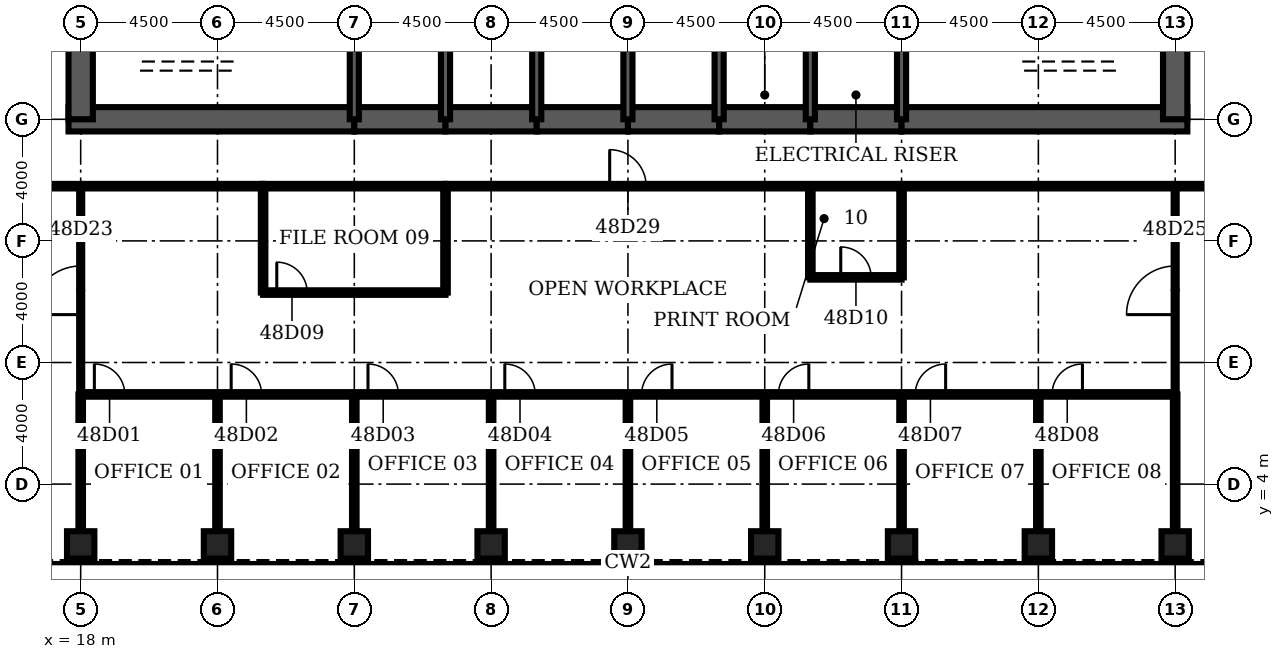
"""IFC4 building model, lengths in metres.
Left out: names, types, materials, properties, quantities, classifications, styles, units other than length and angle.
Written with IfcOpenShell. Run it as: python <this file> out.ifc"""

import sys

from ifc_helpers import new_model, si_unit, direction, frame, frame_2d, origin, origin_2d, place, context, subcontext, project, spatial, rectangle, hollow_rectangle, extrude, element, fill, save


model = new_model("IFC4")
c1 = context("Model", 3, precision=1e-05, world=origin(), true_north=direction((0.0, 1.0)))
c2 = subcontext(c1, "Body", "Model", "MODEL_VIEW")
j1 = project(units=[si_unit("LENGTHUNIT", "METRE"), si_unit("PLANEANGLEUNIT", "RADIAN")], contexts=[c1])
p1 = place(None, origin())
s1 = spatial("IfcSite", under=j1, at=p1, CompositionType="ELEMENT")
p2 = place(p1, origin())
s2 = spatial("IfcBuilding", under=s1, at=p2, CompositionType="ELEMENT")
p3 = place(p2, frame((0.0, 0.0, 215.2)))
s3 = spatial("IfcBuildingStorey", under=s2, at=p3, CompositionType="ELEMENT", Elevation=215.2)
for number, where, z_axis, x_axis in (
    (1, (18.0, 2.0, 0.0), (0.0, 0.0, 1.0), (0.0, 1.0, 0.0)),
    (2, (22.5, 2.0, 0.0), (0.0, 0.0, 1.0), (0.0, 1.0, 0.0)),
    (3, (27.0, 2.0, 0.0), (0.0, 0.0, 1.0), (0.0, 1.0, 0.0)),
    (4, (31.5, 2.0, 0.0), (0.0, 0.0, 1.0), (0.0, 1.0, 0.0)),
    (5, (36.0, 2.0, 0.0), (0.0, 0.0, 1.0), (0.0, 1.0, 0.0)),
    (6, (40.5, 2.0, 0.0), (0.0, 0.0, 1.0), (0.0, 1.0, 0.0)),
    (7, (45.0, 2.0, 0.0), (0.0, 0.0, 1.0), (0.0, 1.0, 0.0)),
    (8, (49.5, 2.0, 0.0), (0.0, 0.0, 1.0), (0.0, 1.0, 0.0)),
    (9, (54.0, 2.0, 0.0), (0.0, 0.0, 1.0), (0.0, 1.0, 0.0)),
):
    element("IfcColumn", number, at=place(p3, frame(where, z_axis=z_axis, x_axis=x_axis)), inside=s3, PredefinedType="COLUMN", context=c2, shape_type="SweptSolid", body=[
        extrude(hollow_rectangle(XDim=0.9, YDim=0.9, WallThickness=0.08, at=origin_2d()), origin(), (0.0, 0.0, 1.0), 4.2),
    ])
p4 = place(p3, frame((17.6, 16.0, 0.0), z_axis=(0.0, 0.0, 1.0), x_axis=(1.0, 0.0, 0.0)))
e10 = element("IfcWall", 10, at=p4, inside=s3, PredefinedType="SHEAR", context=c2, shape_type="SweptSolid", body=[
    extrude(rectangle(XDim=9.4, YDim=0.8, at=frame_2d((4.7, 0.0))), origin(), (0.0, 0.0, 1.0), 4.2),
])
for number, where, z_axis, x_axis in (
    (11, (27.0, 16.0, 0.0), (0.0, 0.0, 1.0), (1.0, 0.0, 0.0)),
    (12, (30.0, 16.0, 0.0), (0.0, 0.0, 1.0), (1.0, 0.0, 0.0)),
    (13, (33.0, 16.0, 0.0), (0.0, 0.0, 1.0), (1.0, 0.0, 0.0)),
    (14, (36.0, 16.0, 0.0), (0.0, 0.0, 1.0), (1.0, 0.0, 0.0)),
    (15, (39.0, 16.0, 0.0), (0.0, 0.0, 1.0), (1.0, 0.0, 0.0)),
    (16, (42.0, 16.0, 0.0), (0.0, 0.0, 1.0), (1.0, 0.0, 0.0)),
):
    element("IfcWall", number, at=place(p3, frame(where, z_axis=z_axis, x_axis=x_axis)), inside=s3, PredefinedType="SHEAR", context=c2, shape_type="SweptSolid", body=[
        extrude(rectangle(XDim=3.0, YDim=0.8, at=frame_2d((1.5, 0.0))), origin(), (0.0, 0.0, 1.0), 4.2),
    ])
p5 = place(p3, frame((45.0, 16.0, 0.0), z_axis=(0.0, 0.0, 1.0), x_axis=(1.0, 0.0, 0.0)))
e17 = element("IfcWall", 17, at=p5, inside=s3, PredefinedType="SHEAR", context=c2, shape_type="SweptSolid", body=[
    extrude(rectangle(XDim=9.4, YDim=0.8, at=frame_2d((4.7, 0.0))), origin(), (0.0, 0.0, 1.0), 4.2),
])
for number, where, z_axis, x_axis in (
    (18, (18.0, 19.2, 0.0), (0.0, 0.0, 1.0), (0.0, -1.0, 0.0)),
    (19, (54.0, 16.0, 0.0), (0.0, 0.0, 1.0), (0.0, 1.0, 0.0)),
):
    element("IfcWall", number, at=place(p3, frame(where, z_axis=z_axis, x_axis=x_axis)), inside=s3, PredefinedType="SHEAR", context=c2, shape_type="SweptSolid", body=[
        extrude(rectangle(XDim=3.2, YDim=0.8, at=frame_2d((1.6, 0.0))), origin(), (0.0, 0.0, 1.0), 4.2),
    ])
for number, where, z_axis, x_axis in (
    (20, (27.0, 16.0, 0.0), (0.0, 0.0, 1.0), (0.0, 1.0, 0.0)),
    (21, (30.0, 16.0, 0.0), (0.0, 0.0, 1.0), (0.0, 1.0, 0.0)),
    (22, (33.0, 16.0, 0.0), (0.0, 0.0, 1.0), (0.0, 1.0, 0.0)),
    (23, (36.0, 16.0, 0.0), (0.0, 0.0, 1.0), (0.0, 1.0, 0.0)),
    (24, (39.0, 16.0, 0.0), (0.0, 0.0, 1.0), (0.0, 1.0, 0.0)),
    (25, (42.0, 16.0, 0.0), (0.0, 0.0, 1.0), (0.0, 1.0, 0.0)),
    (26, (45.0, 16.0, 0.0), (0.0, 0.0, 1.0), (0.0, 1.0, 0.0)),
):
    element("IfcWall", number, at=place(p3, frame(where, z_axis=z_axis, x_axis=x_axis)), inside=s3, PredefinedType="SOLIDWALL", context=c2, shape_type="SweptSolid", body=[
        extrude(rectangle(XDim=3.2, YDim=0.3, at=frame_2d((1.6, 0.0))), origin(), (0.0, 0.0, 1.0), 4.2),
    ])
p6 = place(p3, frame((39.15, 17.35, 0.0), z_axis=(0.0, 0.0, 1.0), x_axis=(1.0, 0.0, 0.0)))
e27 = element("IfcWall", 27, at=p6, inside=s3, PredefinedType="SOLIDWALL", context=c2, shape_type="SweptSolid", body=[
    extrude(rectangle(XDim=2.7, YDim=0.3, at=frame_2d((1.35, 0.0))), origin(), (0.0, 0.0, 1.0), 4.04),
])
p7 = place(p6, frame((0.85, 0.0, 0.0)))
e28 = element("IfcOpeningElement", 28, at=p7, cuts=e27, PredefinedType="OPENING", context=c2, shape_type="SweptSolid", body=[
    extrude(rectangle(XDim=1.0, YDim=2.1, at=frame_2d((0.5, 1.05))), frame((0.0, 0.16, 0.0), z_axis=(0.0, -1.0, 0.0), x_axis=(1.0, 0.0, 0.0)), (0.0, 0.0, 1.0), 0.32),
])
p8 = place(p3, frame((42.15, 17.35, 0.0), z_axis=(0.0, 0.0, 1.0), x_axis=(1.0, 0.0, 0.0)))
e29 = element("IfcWall", 29, at=p8, inside=s3, PredefinedType="SOLIDWALL", context=c2, shape_type="SweptSolid", body=[
    extrude(rectangle(XDim=2.7, YDim=0.3, at=frame_2d((1.35, 0.0))), origin(), (0.0, 0.0, 1.0), 4.04),
])
p9 = place(p8, frame((0.85, 0.0, 0.0)))
e30 = element("IfcOpeningElement", 30, at=p9, cuts=e29, PredefinedType="OPENING", context=c2, shape_type="SweptSolid", body=[
    extrude(rectangle(XDim=1.0, YDim=2.1, at=frame_2d((0.5, 1.05))), frame((0.0, 0.16, 0.0), z_axis=(0.0, -1.0, 0.0), x_axis=(1.0, 0.0, 0.0)), (0.0, 0.0, 1.0), 0.32),
])
p10 = place(p3, frame((18.0, 6.95, 0.0), z_axis=(0.0, 0.0, 1.0), x_axis=(1.0, 0.0, 0.0)))
e31 = element("IfcWall", 31, at=p10, inside=s3, PredefinedType="PARTITIONING", context=c2, shape_type="SweptSolid", body=[
    extrude(rectangle(XDim=36.0, YDim=0.15, at=frame_2d((18.0, 0.0))), origin(), (0.0, 0.0, 1.0), 3.0),
])
p11 = place(p10, frame((0.45, 0.0, 0.0)))
e32 = element("IfcOpeningElement", 32, at=p11, cuts=e31, PredefinedType="OPENING", context=c2, shape_type="SweptSolid", body=[
    extrude(rectangle(XDim=1.0, YDim=2.1, at=frame_2d((0.5, 1.05))), frame((0.0, 0.085, 0.0), z_axis=(0.0, -1.0, 0.0), x_axis=(1.0, 0.0, 0.0)), (0.0, 0.0, 1.0), 0.17),
])
p12 = place(p10, frame((4.95, 0.0, 0.0)))
e33 = element("IfcOpeningElement", 33, at=p12, cuts=e31, PredefinedType="OPENING", context=c2, shape_type="SweptSolid", body=[
    extrude(rectangle(XDim=1.0, YDim=2.1, at=frame_2d((0.5, 1.05))), frame((0.0, 0.085, 0.0), z_axis=(0.0, -1.0, 0.0), x_axis=(1.0, 0.0, 0.0)), (0.0, 0.0, 1.0), 0.17),
])
p13 = place(p10, frame((9.45, 0.0, 0.0)))
e34 = element("IfcOpeningElement", 34, at=p13, cuts=e31, PredefinedType="OPENING", context=c2, shape_type="SweptSolid", body=[
    extrude(rectangle(XDim=1.0, YDim=2.1, at=frame_2d((0.5, 1.05))), frame((0.0, 0.085, 0.0), z_axis=(0.0, -1.0, 0.0), x_axis=(1.0, 0.0, 0.0)), (0.0, 0.0, 1.0), 0.17),
])
p14 = place(p10, frame((13.95, 0.0, 0.0)))
e35 = element("IfcOpeningElement", 35, at=p14, cuts=e31, PredefinedType="OPENING", context=c2, shape_type="SweptSolid", body=[
    extrude(rectangle(XDim=1.0, YDim=2.1, at=frame_2d((0.5, 1.05))), frame((0.0, 0.085, 0.0), z_axis=(0.0, -1.0, 0.0), x_axis=(1.0, 0.0, 0.0)), (0.0, 0.0, 1.0), 0.17),
])
p15 = place(p10, frame((18.45, 0.0, 0.0)))
e36 = element("IfcOpeningElement", 36, at=p15, cuts=e31, PredefinedType="OPENING", context=c2, shape_type="SweptSolid", body=[
    extrude(rectangle(XDim=1.0, YDim=2.1, at=frame_2d((0.5, 1.05))), frame((0.0, 0.085, 0.0), z_axis=(0.0, -1.0, 0.0), x_axis=(1.0, 0.0, 0.0)), (0.0, 0.0, 1.0), 0.17),
])
p16 = place(p10, frame((22.95, 0.0, 0.0)))
e37 = element("IfcOpeningElement", 37, at=p16, cuts=e31, PredefinedType="OPENING", context=c2, shape_type="SweptSolid", body=[
    extrude(rectangle(XDim=1.0, YDim=2.1, at=frame_2d((0.5, 1.05))), frame((0.0, 0.085, 0.0), z_axis=(0.0, -1.0, 0.0), x_axis=(1.0, 0.0, 0.0)), (0.0, 0.0, 1.0), 0.17),
])
p17 = place(p10, frame((27.45, 0.0, 0.0)))
e38 = element("IfcOpeningElement", 38, at=p17, cuts=e31, PredefinedType="OPENING", context=c2, shape_type="SweptSolid", body=[
    extrude(rectangle(XDim=1.0, YDim=2.1, at=frame_2d((0.5, 1.05))), frame((0.0, 0.085, 0.0), z_axis=(0.0, -1.0, 0.0), x_axis=(1.0, 0.0, 0.0)), (0.0, 0.0, 1.0), 0.17),
])
p18 = place(p10, frame((31.95, 0.0, 0.0)))
e39 = element("IfcOpeningElement", 39, at=p18, cuts=e31, PredefinedType="OPENING", context=c2, shape_type="SweptSolid", body=[
    extrude(rectangle(XDim=1.0, YDim=2.1, at=frame_2d((0.5, 1.05))), frame((0.0, 0.085, 0.0), z_axis=(0.0, -1.0, 0.0), x_axis=(1.0, 0.0, 0.0)), (0.0, 0.0, 1.0), 0.17),
])
p19 = place(p3, frame((24.0, 10.3, 0.0), z_axis=(0.0, 0.0, 1.0), x_axis=(1.0, 0.0, 0.0)))
e40 = element("IfcWall", 40, at=p19, inside=s3, PredefinedType="PARTITIONING", context=c2, shape_type="SweptSolid", body=[
    extrude(rectangle(XDim=6.0, YDim=0.15, at=frame_2d((3.0, 0.0))), origin(), (0.0, 0.0, 1.0), 3.0),
])
p20 = place(p19, frame((0.45, 0.0, 0.0)))
e41 = element("IfcOpeningElement", 41, at=p20, cuts=e40, PredefinedType="OPENING", context=c2, shape_type="SweptSolid", body=[
    extrude(rectangle(XDim=1.0, YDim=2.1, at=frame_2d((0.5, 1.05))), frame((0.0, 0.085, 0.0), z_axis=(0.0, -1.0, 0.0), x_axis=(1.0, 0.0, 0.0)), (0.0, 0.0, 1.0), 0.17),
])
p21 = place(p3, frame((42.0, 10.8, 0.0), z_axis=(0.0, 0.0, 1.0), x_axis=(1.0, 0.0, 0.0)))
e42 = element("IfcWall", 42, at=p21, inside=s3, PredefinedType="PARTITIONING", context=c2, shape_type="SweptSolid", body=[
    extrude(rectangle(XDim=3.0, YDim=0.15, at=frame_2d((1.5, 0.0))), origin(), (0.0, 0.0, 1.0), 3.0),
])
p22 = place(p21, frame((1.0, 0.0, 0.0)))
e43 = element("IfcOpeningElement", 43, at=p22, cuts=e42, PredefinedType="OPENING", context=c2, shape_type="SweptSolid", body=[
    extrude(rectangle(XDim=1.0, YDim=2.1, at=frame_2d((0.5, 1.05))), frame((0.0, 0.085, 0.0), z_axis=(0.0, -1.0, 0.0), x_axis=(1.0, 0.0, 0.0)), (0.0, 0.0, 1.0), 0.17),
])
p23 = place(p3, frame((15.2, 13.8, 0.0), z_axis=(0.0, 0.0, 1.0), x_axis=(1.0, 0.0, 0.0)))
e44 = element("IfcWall", 44, at=p23, inside=s3, PredefinedType="PARTITIONING", context=c2, shape_type="SweptSolid", body=[
    extrude(rectangle(XDim=8.8, YDim=0.15, at=frame_2d((4.4, 0.0))), origin(), (0.0, 0.0, 1.0), 3.0),
])
p24 = place(p3, frame((24.0, 13.8, 0.0), z_axis=(0.0, 0.0, 1.0), x_axis=(1.0, 0.0, 0.0)))
e45 = element("IfcWall", 45, at=p24, inside=s3, PredefinedType="PARTITIONING", context=c2, shape_type="SweptSolid", body=[
    extrude(rectangle(XDim=6.0, YDim=0.15, at=frame_2d((3.0, 0.0))), origin(), (0.0, 0.0, 1.0), 3.0),
])
p25 = place(p3, frame((30.0, 13.8, 0.0), z_axis=(0.0, 0.0, 1.0), x_axis=(1.0, 0.0, 0.0)))
e46 = element("IfcWall", 46, at=p25, inside=s3, PredefinedType="PARTITIONING", context=c2, shape_type="SweptSolid", body=[
    extrude(rectangle(XDim=26.8, YDim=0.15, at=frame_2d((13.4, 0.0))), origin(), (0.0, 0.0, 1.0), 3.0),
])
p26 = place(p25, frame((5.4, 0.0, 0.0)))
e47 = element("IfcOpeningElement", 47, at=p26, cuts=e46, PredefinedType="OPENING", context=c2, shape_type="SweptSolid", body=[
    extrude(rectangle(XDim=1.2, YDim=2.1, at=frame_2d((0.6, 1.05))), frame((0.0, 0.085, 0.0), z_axis=(0.0, -1.0, 0.0), x_axis=(1.0, 0.0, 0.0)), (0.0, 0.0, 1.0), 0.17),
])
p27 = place(p3, frame((18.0, 2.45, 0.0), z_axis=(0.0, 0.0, 1.0), x_axis=(0.0, 1.0, 0.0)))
e48 = element("IfcWall", 48, at=p27, inside=s3, PredefinedType="PARTITIONING", context=c2, shape_type="SweptSolid", body=[
    extrude(rectangle(XDim=4.5, YDim=0.15, at=frame_2d((2.25, 0.0))), origin(), (0.0, 0.0, 1.0), 3.0),
])
p28 = place(p3, frame((18.0, 6.95, 0.0), z_axis=(0.0, 0.0, 1.0), x_axis=(0.0, 1.0, 0.0)))
e49 = element("IfcWall", 49, at=p28, inside=s3, PredefinedType="PARTITIONING", context=c2, shape_type="SweptSolid", body=[
    extrude(rectangle(XDim=6.85, YDim=0.1, at=frame_2d((3.425, 0.0))), origin(), (0.0, 0.0, 1.0), 3.0),
])
p29 = place(p28, frame((2.625, 0.0, 0.0)))
e50 = element("IfcOpeningElement", 50, at=p29, cuts=e49, PredefinedType="OPENING", context=c2, shape_type="SweptSolid", body=[
    extrude(rectangle(XDim=1.6, YDim=2.1, at=frame_2d((0.8, 1.05))), frame((0.0, 0.06, 0.0), z_axis=(0.0, -1.0, 0.0), x_axis=(1.0, 0.0, 0.0)), (0.0, 0.0, 1.0), 0.12),
])
p30 = place(p3, frame((22.5, 2.45, 0.0), z_axis=(0.0, 0.0, 1.0), x_axis=(0.0, 1.0, 0.0)))
e51 = element("IfcWall", 51, at=p30, inside=s3, PredefinedType="PARTITIONING", context=c2, shape_type="SweptSolid", body=[
    extrude(rectangle(XDim=4.5, YDim=0.15, at=frame_2d((2.25, 0.0))), origin(), (0.0, 0.0, 1.0), 3.0),
])
p31 = place(p3, frame((24.0, 10.3, 0.0), z_axis=(0.0, 0.0, 1.0), x_axis=(0.0, 1.0, 0.0)))
e52 = element("IfcWall", 52, at=p31, inside=s3, PredefinedType="PARTITIONING", context=c2, shape_type="SweptSolid", body=[
    extrude(rectangle(XDim=3.5, YDim=0.15, at=frame_2d((1.75, 0.0))), origin(), (0.0, 0.0, 1.0), 3.0),
])
p32 = place(p3, frame((27.0, 2.45, 0.0), z_axis=(0.0, 0.0, 1.0), x_axis=(0.0, 1.0, 0.0)))
e53 = element("IfcWall", 53, at=p32, inside=s3, PredefinedType="PARTITIONING", context=c2, shape_type="SweptSolid", body=[
    extrude(rectangle(XDim=4.5, YDim=0.15, at=frame_2d((2.25, 0.0))), origin(), (0.0, 0.0, 1.0), 3.0),
])
p33 = place(p3, frame((30.0, 10.3, 0.0), z_axis=(0.0, 0.0, 1.0), x_axis=(0.0, 1.0, 0.0)))
e54 = element("IfcWall", 54, at=p33, inside=s3, PredefinedType="PARTITIONING", context=c2, shape_type="SweptSolid", body=[
    extrude(rectangle(XDim=3.5, YDim=0.15, at=frame_2d((1.75, 0.0))), origin(), (0.0, 0.0, 1.0), 3.0),
])
for number, where, z_axis, x_axis in (
    (55, (31.5, 2.45, 0.0), (0.0, 0.0, 1.0), (0.0, 1.0, 0.0)),
    (56, (36.0, 2.45, 0.0), (0.0, 0.0, 1.0), (0.0, 1.0, 0.0)),
    (57, (40.5, 2.45, 0.0), (0.0, 0.0, 1.0), (0.0, 1.0, 0.0)),
):
    element("IfcWall", number, at=place(p3, frame(where, z_axis=z_axis, x_axis=x_axis)), inside=s3, PredefinedType="PARTITIONING", context=c2, shape_type="SweptSolid", body=[
        extrude(rectangle(XDim=4.5, YDim=0.15, at=frame_2d((2.25, 0.0))), origin(), (0.0, 0.0, 1.0), 3.0),
    ])
p34 = place(p3, frame((42.0, 10.8, 0.0), z_axis=(0.0, 0.0, 1.0), x_axis=(0.0, 1.0, 0.0)))
e58 = element("IfcWall", 58, at=p34, inside=s3, PredefinedType="PARTITIONING", context=c2, shape_type="SweptSolid", body=[
    extrude(rectangle(XDim=3.0, YDim=0.15, at=frame_2d((1.5, 0.0))), origin(), (0.0, 0.0, 1.0), 3.0),
])
p35 = place(p3, frame((45.0, 2.45, 0.0), z_axis=(0.0, 0.0, 1.0), x_axis=(0.0, 1.0, 0.0)))
e59 = element("IfcWall", 59, at=p35, inside=s3, PredefinedType="PARTITIONING", context=c2, shape_type="SweptSolid", body=[
    extrude(rectangle(XDim=4.5, YDim=0.15, at=frame_2d((2.25, 0.0))), origin(), (0.0, 0.0, 1.0), 3.0),
])
p36 = place(p3, frame((45.0, 10.8, 0.0), z_axis=(0.0, 0.0, 1.0), x_axis=(0.0, 1.0, 0.0)))
e60 = element("IfcWall", 60, at=p36, inside=s3, PredefinedType="PARTITIONING", context=c2, shape_type="SweptSolid", body=[
    extrude(rectangle(XDim=3.0, YDim=0.15, at=frame_2d((1.5, 0.0))), origin(), (0.0, 0.0, 1.0), 3.0),
])
for number, where, z_axis, x_axis in (
    (61, (49.5, 2.45, 0.0), (0.0, 0.0, 1.0), (0.0, 1.0, 0.0)),
    (62, (54.0, 2.45, 0.0), (0.0, 0.0, 1.0), (0.0, 1.0, 0.0)),
):
    element("IfcWall", number, at=place(p3, frame(where, z_axis=z_axis, x_axis=x_axis)), inside=s3, PredefinedType="PARTITIONING", context=c2, shape_type="SweptSolid", body=[
        extrude(rectangle(XDim=4.5, YDim=0.15, at=frame_2d((2.25, 0.0))), origin(), (0.0, 0.0, 1.0), 3.0),
    ])
p37 = place(p3, frame((54.0, 6.95, 0.0), z_axis=(0.0, 0.0, 1.0), x_axis=(0.0, 1.0, 0.0)))
e63 = element("IfcWall", 63, at=p37, inside=s3, PredefinedType="PARTITIONING", context=c2, shape_type="SweptSolid", body=[
    extrude(rectangle(XDim=6.85, YDim=0.1, at=frame_2d((3.425, 0.0))), origin(), (0.0, 0.0, 1.0), 3.0),
])
p38 = place(p37, frame((2.625, 0.0, 0.0)))
e64 = element("IfcOpeningElement", 64, at=p38, cuts=e63, PredefinedType="OPENING", context=c2, shape_type="SweptSolid", body=[
    extrude(rectangle(XDim=1.6, YDim=2.1, at=frame_2d((0.8, 1.05))), frame((0.0, 0.06, 0.0), z_axis=(0.0, -1.0, 0.0), x_axis=(1.0, 0.0, 0.0)), (0.0, 0.0, 1.0), 0.12),
])
p39 = place(p7, origin())
e65 = element("IfcDoor", 65, at=p39, inside=s3, OperationType="SINGLE_SWING_LEFT", PredefinedType="DOOR", context=c2, shape_type="SweptSolid", body=[
    extrude(rectangle(XDim=1.0, YDim=2.1, at=frame_2d((0.5, 1.05))), frame((0.0, 0.025, 0.0), z_axis=(0.0, -1.0, 0.0), x_axis=(1.0, 0.0, 0.0)), (0.0, 0.0, 1.0), 0.05),
])
fill(e28, e65)
p40 = place(p9, origin())
e66 = element("IfcDoor", 66, at=p40, inside=s3, OperationType="SINGLE_SWING_LEFT", PredefinedType="DOOR", context=c2, shape_type="SweptSolid", body=[
    extrude(rectangle(XDim=1.0, YDim=2.1, at=frame_2d((0.5, 1.05))), frame((0.0, 0.025, 0.0), z_axis=(0.0, -1.0, 0.0), x_axis=(1.0, 0.0, 0.0)), (0.0, 0.0, 1.0), 0.05),
])
fill(e30, e66)
p41 = place(p11, origin())
e67 = element("IfcDoor", 67, at=p41, inside=s3, OperationType="SINGLE_SWING_LEFT", PredefinedType="DOOR", context=c2, shape_type="SweptSolid", body=[
    extrude(rectangle(XDim=1.0, YDim=2.1, at=frame_2d((0.5, 1.05))), frame((0.0, 0.025, 0.0), z_axis=(0.0, -1.0, 0.0), x_axis=(1.0, 0.0, 0.0)), (0.0, 0.0, 1.0), 0.05),
])
fill(e32, e67)
p42 = place(p12, origin())
e68 = element("IfcDoor", 68, at=p42, inside=s3, OperationType="SINGLE_SWING_LEFT", PredefinedType="DOOR", context=c2, shape_type="SweptSolid", body=[
    extrude(rectangle(XDim=1.0, YDim=2.1, at=frame_2d((0.5, 1.05))), frame((0.0, 0.025, 0.0), z_axis=(0.0, -1.0, 0.0), x_axis=(1.0, 0.0, 0.0)), (0.0, 0.0, 1.0), 0.05),
])
fill(e33, e68)
p43 = place(p13, origin())
e69 = element("IfcDoor", 69, at=p43, inside=s3, OperationType="SINGLE_SWING_LEFT", PredefinedType="DOOR", context=c2, shape_type="SweptSolid", body=[
    extrude(rectangle(XDim=1.0, YDim=2.1, at=frame_2d((0.5, 1.05))), frame((0.0, 0.025, 0.0), z_axis=(0.0, -1.0, 0.0), x_axis=(1.0, 0.0, 0.0)), (0.0, 0.0, 1.0), 0.05),
])
fill(e34, e69)
p44 = place(p14, origin())
e70 = element("IfcDoor", 70, at=p44, inside=s3, OperationType="SINGLE_SWING_LEFT", PredefinedType="DOOR", context=c2, shape_type="SweptSolid", body=[
    extrude(rectangle(XDim=1.0, YDim=2.1, at=frame_2d((0.5, 1.05))), frame((0.0, 0.025, 0.0), z_axis=(0.0, -1.0, 0.0), x_axis=(1.0, 0.0, 0.0)), (0.0, 0.0, 1.0), 0.05),
])
fill(e35, e70)
p45 = place(p15, origin())
e71 = element("IfcDoor", 71, at=p45, inside=s3, OperationType="SINGLE_SWING_RIGHT", PredefinedType="DOOR", context=c2, shape_type="SweptSolid", body=[
    extrude(rectangle(XDim=1.0, YDim=2.1, at=frame_2d((0.5, 1.05))), frame((0.0, 0.025, 0.0), z_axis=(0.0, -1.0, 0.0), x_axis=(1.0, 0.0, 0.0)), (0.0, 0.0, 1.0), 0.05),
])
fill(e36, e71)
p46 = place(p16, origin())
e72 = element("IfcDoor", 72, at=p46, inside=s3, OperationType="SINGLE_SWING_RIGHT", PredefinedType="DOOR", context=c2, shape_type="SweptSolid", body=[
    extrude(rectangle(XDim=1.0, YDim=2.1, at=frame_2d((0.5, 1.05))), frame((0.0, 0.025, 0.0), z_axis=(0.0, -1.0, 0.0), x_axis=(1.0, 0.0, 0.0)), (0.0, 0.0, 1.0), 0.05),
])
fill(e37, e72)
p47 = place(p17, origin())
e73 = element("IfcDoor", 73, at=p47, inside=s3, OperationType="SINGLE_SWING_RIGHT", PredefinedType="DOOR", context=c2, shape_type="SweptSolid", body=[
    extrude(rectangle(XDim=1.0, YDim=2.1, at=frame_2d((0.5, 1.05))), frame((0.0, 0.025, 0.0), z_axis=(0.0, -1.0, 0.0), x_axis=(1.0, 0.0, 0.0)), (0.0, 0.0, 1.0), 0.05),
])
fill(e38, e73)
p48 = place(p18, origin())
e74 = element("IfcDoor", 74, at=p48, inside=s3, OperationType="SINGLE_SWING_RIGHT", PredefinedType="DOOR", context=c2, shape_type="SweptSolid", body=[
    extrude(rectangle(XDim=1.0, YDim=2.1, at=frame_2d((0.5, 1.05))), frame((0.0, 0.025, 0.0), z_axis=(0.0, -1.0, 0.0), x_axis=(1.0, 0.0, 0.0)), (0.0, 0.0, 1.0), 0.05),
])
fill(e39, e74)
p49 = place(p20, origin())
e75 = element("IfcDoor", 75, at=p49, inside=s3, OperationType="SINGLE_SWING_LEFT", PredefinedType="DOOR", context=c2, shape_type="SweptSolid", body=[
    extrude(rectangle(XDim=1.0, YDim=2.1, at=frame_2d((0.5, 1.05))), frame((0.0, 0.025, 0.0), z_axis=(0.0, -1.0, 0.0), x_axis=(1.0, 0.0, 0.0)), (0.0, 0.0, 1.0), 0.05),
])
fill(e41, e75)
p50 = place(p22, origin())
e76 = element("IfcDoor", 76, at=p50, inside=s3, OperationType="SINGLE_SWING_LEFT", PredefinedType="DOOR", context=c2, shape_type="SweptSolid", body=[
    extrude(rectangle(XDim=1.0, YDim=2.1, at=frame_2d((0.5, 1.05))), frame((0.0, 0.025, 0.0), z_axis=(0.0, -1.0, 0.0), x_axis=(1.0, 0.0, 0.0)), (0.0, 0.0, 1.0), 0.05),
])
fill(e43, e76)
p51 = place(p29, origin())
e77 = element("IfcDoor", 77, at=p51, inside=s3, OperationType="SINGLE_SWING_LEFT", PredefinedType="DOOR", context=c2, shape_type="SweptSolid", body=[
    extrude(rectangle(XDim=1.6, YDim=2.1, at=frame_2d((0.8, 1.05))), frame((0.0, 0.025, 0.0), z_axis=(0.0, -1.0, 0.0), x_axis=(1.0, 0.0, 0.0)), (0.0, 0.0, 1.0), 0.05),
])
fill(e50, e77)
p52 = place(p38, origin())
e78 = element("IfcDoor", 78, at=p52, inside=s3, OperationType="SINGLE_SWING_LEFT", PredefinedType="DOOR", context=c2, shape_type="SweptSolid", body=[
    extrude(rectangle(XDim=1.6, YDim=2.1, at=frame_2d((0.8, 1.05))), frame((0.0, 0.025, 0.0), z_axis=(0.0, -1.0, 0.0), x_axis=(1.0, 0.0, 0.0)), (0.0, 0.0, 1.0), 0.05),
])
fill(e64, e78)
p53 = place(p26, origin())
e79 = element("IfcDoor", 79, at=p53, inside=s3, OperationType="SINGLE_SWING_LEFT", PredefinedType="DOOR", context=c2, shape_type="SweptSolid", body=[
    extrude(rectangle(XDim=1.2, YDim=2.1, at=frame_2d((0.6, 1.05))), frame((0.0, 0.025, 0.0), z_axis=(0.0, -1.0, 0.0), x_axis=(1.0, 0.0, 0.0)), (0.0, 0.0, 1.0), 0.05),
])
fill(e47, e79)
save(model, sys.argv[1])
